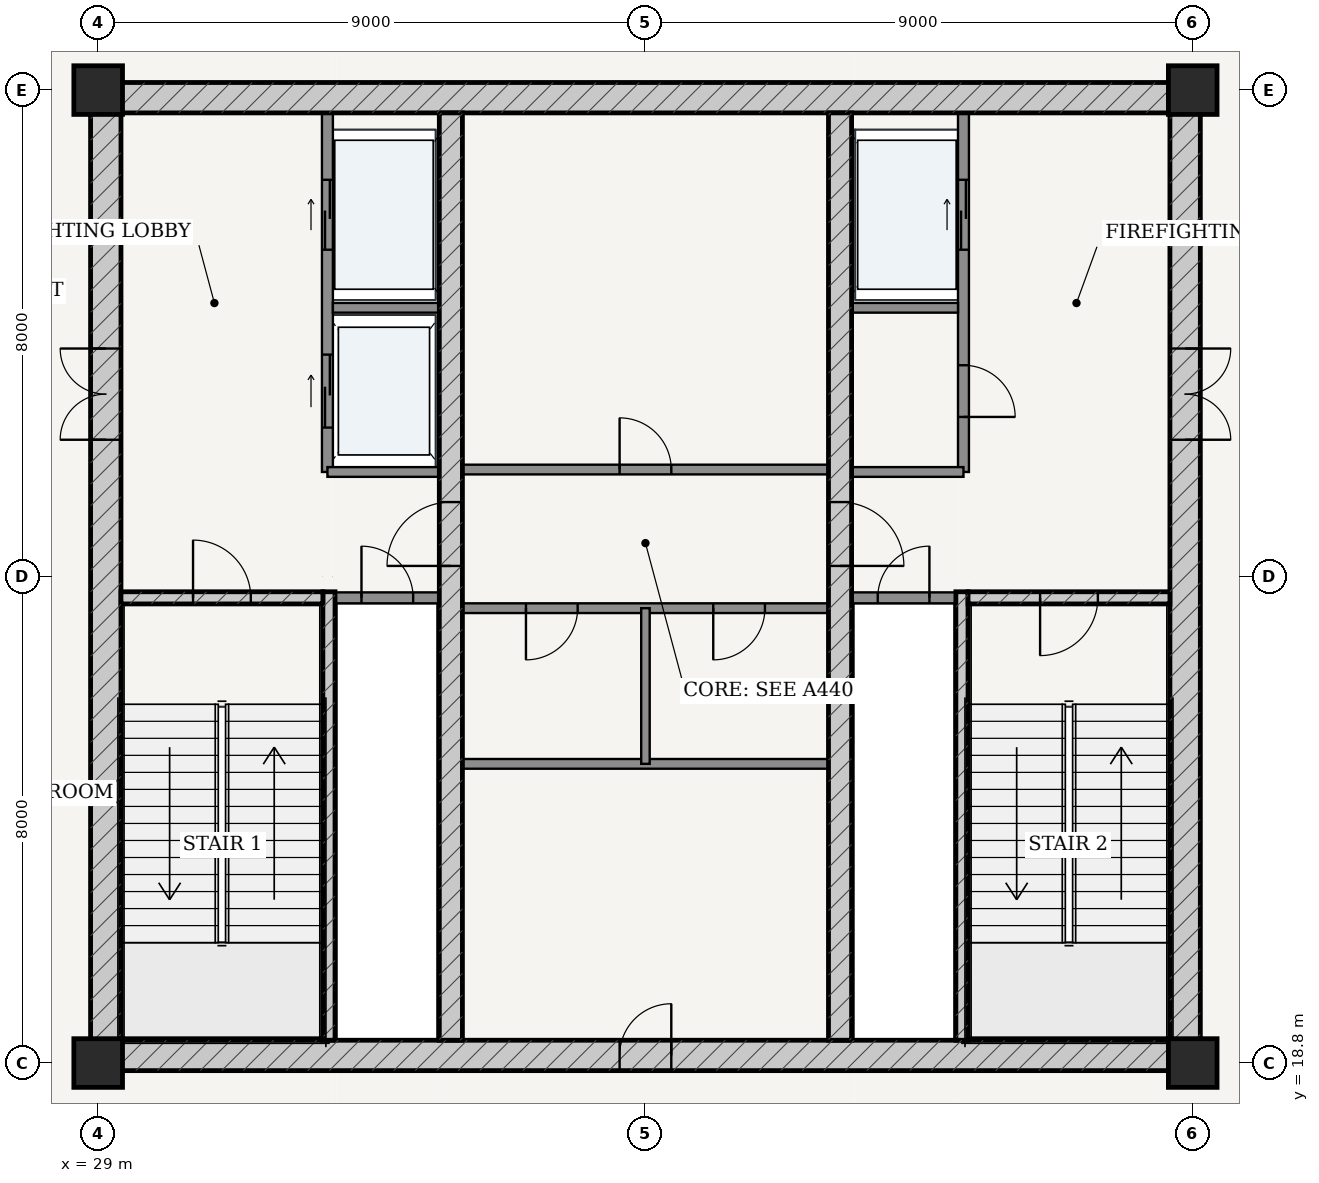
"""IFC4 building model, lengths in metres.
Left out: names, types, materials, properties, quantities, classifications, styles, units other than length and angle.
Written with IfcOpenShell. Run it as: python <this file> out.ifc"""

import sys

from ifc_helpers import new_model, si_unit, direction, frame, frame_2d, origin, origin_2d, place, context, subcontext, project, spatial, rectangle, extrude, source, transform, mapped, element, fill, save


model = new_model("IFC4")
c1 = context("Model", 3, precision=1e-05, world=origin(), true_north=direction((-0.2419218956, 0.970295726276)))
c2 = subcontext(c1, "Body", "Model", "MODEL_VIEW")
j1 = project(units=[si_unit("LENGTHUNIT", "METRE"), si_unit("PLANEANGLEUNIT", "RADIAN")], contexts=[c1])
p1 = place(None, origin())
s1 = spatial("IfcSite", under=j1, at=p1, CompositionType="ELEMENT")
p2 = place(p1, origin())
s2 = spatial("IfcBuilding", under=s1, at=p2, CompositionType="ELEMENT")
p3 = place(p2, frame((0.0, 0.0, 306.1)))
s3 = spatial("IfcBuildingStorey", under=s2, at=p3, CompositionType="ELEMENT", Elevation=306.1)
for number, where, z_axis, x_axis in (
    (1, (29.0, 18.8, 0.0), (0.0, 0.0, 1.0), (1.0, 0.0, 0.0)),
    (2, (47.0, 18.8, 0.0), (0.0, 0.0, 1.0), (1.0, 0.0, 0.0)),
    (3, (47.0, 34.8, 0.0), (0.0, 0.0, 1.0), (1.0, 0.0, 0.0)),
    (4, (29.0, 34.8, 0.0), (0.0, 0.0, 1.0), (1.0, 0.0, 0.0)),
):
    element("IfcColumn", number, at=place(p3, frame(where, z_axis=z_axis, x_axis=x_axis)), inside=s3, PredefinedType="COLUMN", context=c2, shape_type="SweptSolid", body=[
        extrude(rectangle(XDim=0.8, YDim=0.8, at=origin_2d()), origin(), (0.0, 0.0, 1.0), 5.2),
    ])
p4 = place(p3, frame((28.875, 18.925, 0.0), z_axis=(0.0, 0.0, 1.0), x_axis=(1.0, 0.0, 0.0)))
e5 = element("IfcWall", 5, at=p4, inside=s3, PredefinedType="SHEAR", context=c2, shape_type="SweptSolid", body=[
    extrude(rectangle(XDim=18.25, YDim=0.5, at=frame_2d((9.125, 0.0))), origin(), (0.0, 0.0, 1.0), 4.78),
])
p5 = place(p4, frame((8.7, 0.0, 0.0)))
e6 = element("IfcOpeningElement", 6, at=p5, cuts=e5, PredefinedType="OPENING", context=c2, shape_type="SweptSolid", body=[
    extrude(rectangle(XDim=0.85, YDim=2.1, at=frame_2d((0.425, 1.05))), frame((0.0, 0.26, 0.0), z_axis=(0.0, -1.0, 0.0), x_axis=(1.0, 0.0, 0.0)), (0.0, 0.0, 1.0), 0.52),
])
p6 = place(p3, frame((28.875, 34.675, 0.0), z_axis=(0.0, 0.0, 1.0), x_axis=(1.0, 0.0, 0.0)))
e7 = element("IfcWall", 7, at=p6, inside=s3, PredefinedType="SHEAR", context=c2, shape_type="SweptSolid", body=[
    extrude(rectangle(XDim=18.25, YDim=0.5, at=frame_2d((9.125, 0.0))), origin(), (0.0, 0.0, 1.0), 4.78),
])
p7 = place(p3, frame((29.125, 19.175, 0.0), z_axis=(0.0, 0.0, 1.0), x_axis=(0.0, 1.0, 0.0)))
e8 = element("IfcWall", 8, at=p7, inside=s3, PredefinedType="SHEAR", context=c2, shape_type="SweptSolid", body=[
    extrude(rectangle(XDim=15.25, YDim=0.5, at=frame_2d((7.625, 0.0))), origin(), (0.0, 0.0, 1.0), 4.78),
])
p8 = place(p7, frame((9.875, 0.0, 0.0)))
e9 = element("IfcOpeningElement", 9, at=p8, cuts=e8, PredefinedType="OPENING", context=c2, shape_type="SweptSolid", body=[
    extrude(rectangle(XDim=1.5, YDim=2.2, at=frame_2d((0.75, 1.1))), frame((0.0, 0.26, 0.0), z_axis=(0.0, -1.0, 0.0), x_axis=(1.0, 0.0, 0.0)), (0.0, 0.0, 1.0), 0.52),
])
p9 = place(p3, frame((46.875, 19.175, 0.0), z_axis=(0.0, 0.0, 1.0), x_axis=(0.0, 1.0, 0.0)))
e10 = element("IfcWall", 10, at=p9, inside=s3, PredefinedType="SHEAR", context=c2, shape_type="SweptSolid", body=[
    extrude(rectangle(XDim=15.25, YDim=0.5, at=frame_2d((7.625, 0.0))), origin(), (0.0, 0.0, 1.0), 4.78),
])
p10 = place(p9, frame((9.875, 0.0, 0.0)))
e11 = element("IfcOpeningElement", 11, at=p10, cuts=e10, PredefinedType="OPENING", context=c2, shape_type="SweptSolid", body=[
    extrude(rectangle(XDim=1.5, YDim=2.2, at=frame_2d((0.75, 1.1))), frame((0.0, 0.26, 0.0), z_axis=(0.0, -1.0, 0.0), x_axis=(1.0, 0.0, 0.0)), (0.0, 0.0, 1.0), 0.52),
])
p11 = place(p3, frame((32.795, 19.175, 0.0), z_axis=(0.0, 0.0, 1.0), x_axis=(0.0, 1.0, 0.0)))
e12 = element("IfcWall", 12, at=p11, inside=s3, PredefinedType="SOLIDWALL", context=c2, shape_type="SweptSolid", body=[
    extrude(rectangle(XDim=7.375, YDim=0.2, at=frame_2d((3.688, 0.0))), origin(), (0.0, 0.0, 1.0), 4.78),
])
p12 = place(p3, frame((29.375, 26.45, 0.0), z_axis=(0.0, 0.0, 1.0), x_axis=(1.0, 0.0, 0.0)))
e13 = element("IfcWall", 13, at=p12, inside=s3, PredefinedType="SOLIDWALL", context=c2, shape_type="SweptSolid", body=[
    extrude(rectangle(XDim=3.32, YDim=0.2, at=frame_2d((1.66, 0.0))), origin(), (0.0, 0.0, 1.0), 4.78),
])
p13 = place(p12, frame((1.185, 0.0, 0.0)))
e14 = element("IfcOpeningElement", 14, at=p13, cuts=e13, PredefinedType="OPENING", context=c2, shape_type="SweptSolid", body=[
    extrude(rectangle(XDim=0.95, YDim=2.15, at=frame_2d((0.475, 1.075))), frame((0.0, 0.11, 0.0), z_axis=(0.0, -1.0, 0.0), x_axis=(1.0, 0.0, 0.0)), (0.0, 0.0, 1.0), 0.22),
])
p14 = place(p3, frame((43.205, 19.175, 0.0), z_axis=(0.0, 0.0, 1.0), x_axis=(0.0, 1.0, 0.0)))
e15 = element("IfcWall", 15, at=p14, inside=s3, PredefinedType="SOLIDWALL", context=c2, shape_type="SweptSolid", body=[
    extrude(rectangle(XDim=7.375, YDim=0.2, at=frame_2d((3.688, 0.0))), origin(), (0.0, 0.0, 1.0), 4.78),
])
p15 = place(p3, frame((43.305, 26.45, 0.0), z_axis=(0.0, 0.0, 1.0), x_axis=(1.0, 0.0, 0.0)))
e16 = element("IfcWall", 16, at=p15, inside=s3, PredefinedType="SOLIDWALL", context=c2, shape_type="SweptSolid", body=[
    extrude(rectangle(XDim=3.32, YDim=0.2, at=frame_2d((1.66, 0.0))), origin(), (0.0, 0.0, 1.0), 4.78),
])
p16 = place(p15, frame((1.185, 0.0, 0.0)))
e17 = element("IfcOpeningElement", 17, at=p16, cuts=e16, PredefinedType="OPENING", context=c2, shape_type="SweptSolid", body=[
    extrude(rectangle(XDim=0.95, YDim=2.15, at=frame_2d((0.475, 1.075))), frame((0.0, 0.11, 0.0), z_axis=(0.0, -1.0, 0.0), x_axis=(1.0, 0.0, 0.0)), (0.0, 0.0, 1.0), 0.22),
])
p17 = place(p3, frame((34.8, 19.175, 0.0), z_axis=(0.0, 0.0, 1.0), x_axis=(0.0, 1.0, 0.0)))
e18 = element("IfcWall", 18, at=p17, inside=s3, PredefinedType="SHEAR", context=c2, shape_type="SweptSolid", body=[
    extrude(rectangle(XDim=15.25, YDim=0.38, at=frame_2d((7.625, 0.0))), origin(), (0.0, 0.0, 1.0), 4.78),
])
p18 = place(p17, frame((7.8, 0.0, 0.0)))
e19 = element("IfcOpeningElement", 19, at=p18, cuts=e18, PredefinedType="OPENING", context=c2, shape_type="SweptSolid", body=[
    extrude(rectangle(XDim=1.05, YDim=2.15, at=frame_2d((0.525, 1.075))), frame((0.0, 0.2, 0.0), z_axis=(0.0, -1.0, 0.0), x_axis=(1.0, 0.0, 0.0)), (0.0, 0.0, 1.0), 0.4),
])
p19 = place(p3, frame((41.2, 19.175, 0.0), z_axis=(0.0, 0.0, 1.0), x_axis=(0.0, 1.0, 0.0)))
e20 = element("IfcWall", 20, at=p19, inside=s3, PredefinedType="SHEAR", context=c2, shape_type="SweptSolid", body=[
    extrude(rectangle(XDim=15.25, YDim=0.38, at=frame_2d((7.625, 0.0))), origin(), (0.0, 0.0, 1.0), 4.78),
])
p20 = place(p19, frame((7.8, 0.0, 0.0)))
e21 = element("IfcOpeningElement", 21, at=p20, cuts=e20, PredefinedType="OPENING", context=c2, shape_type="SweptSolid", body=[
    extrude(rectangle(XDim=1.05, YDim=2.15, at=frame_2d((0.525, 1.075))), frame((0.0, 0.2, 0.0), z_axis=(0.0, -1.0, 0.0), x_axis=(1.0, 0.0, 0.0)), (0.0, 0.0, 1.0), 0.4),
])
p21 = place(p3, frame((32.9, 26.45, 0.0), z_axis=(0.0, 0.0, 1.0), x_axis=(1.0, 0.0, 0.0)))
e22 = element("IfcWall", 22, at=p21, inside=s3, PredefinedType="PARTITIONING", context=c2, shape_type="SweptSolid", body=[
    extrude(rectangle(XDim=1.71, YDim=0.18, at=frame_2d((0.855, 0.0))), origin(), (0.0, 0.0, 1.0), 4.78),
])
p22 = place(p21, frame((0.43, 0.0, 0.0)))
e23 = element("IfcOpeningElement", 23, at=p22, cuts=e22, PredefinedType="OPENING", context=c2, shape_type="SweptSolid", body=[
    extrude(rectangle(XDim=0.85, YDim=2.1, at=frame_2d((0.425, 1.05))), frame((0.0, 0.1, 0.0), z_axis=(0.0, -1.0, 0.0), x_axis=(1.0, 0.0, 0.0)), (0.0, 0.0, 1.0), 0.2),
])
p23 = place(p3, frame((41.39, 26.45, 0.0), z_axis=(0.0, 0.0, 1.0), x_axis=(1.0, 0.0, 0.0)))
e24 = element("IfcWall", 24, at=p23, inside=s3, PredefinedType="PARTITIONING", context=c2, shape_type="SweptSolid", body=[
    extrude(rectangle(XDim=1.71, YDim=0.18, at=frame_2d((0.855, 0.0))), origin(), (0.0, 0.0, 1.0), 4.78),
])
p24 = place(p23, frame((0.43, 0.0, 0.0)))
e25 = element("IfcOpeningElement", 25, at=p24, cuts=e24, PredefinedType="OPENING", context=c2, shape_type="SweptSolid", body=[
    extrude(rectangle(XDim=0.85, YDim=2.1, at=frame_2d((0.425, 1.05))), frame((0.0, 0.1, 0.0), z_axis=(0.0, -1.0, 0.0), x_axis=(1.0, 0.0, 0.0)), (0.0, 0.0, 1.0), 0.2),
])
p25 = place(p3, frame((32.77, 28.52, 0.0), z_axis=(0.0, 0.0, 1.0), x_axis=(0.0, 1.0, 0.0)))
e26 = element("IfcWall", 26, at=p25, inside=s3, PredefinedType="PARTITIONING", context=c2, shape_type="SweptSolid", body=[
    extrude(rectangle(XDim=5.905, YDim=0.18, at=frame_2d((2.953, 0.0))), origin(), (0.0, 0.0, 1.0), 4.78),
])
p26 = place(p25, frame((3.655, 0.0, 0.0)))
e27 = element("IfcOpeningElement", 27, at=p26, cuts=e26, PredefinedType="OPENING", context=c2, shape_type="SweptSolid", body=[
    extrude(rectangle(XDim=1.15, YDim=2.2, at=frame_2d((0.575, 1.1))), frame((0.0, 0.1, 0.0), z_axis=(0.0, -1.0, 0.0), x_axis=(1.0, 0.0, 0.0)), (0.0, 0.0, 1.0), 0.2),
])
p27 = place(p25, frame((0.73, 0.0, 0.0)))
e28 = element("IfcOpeningElement", 28, at=p27, cuts=e26, PredefinedType="OPENING", context=c2, shape_type="SweptSolid", body=[
    extrude(rectangle(XDim=1.2, YDim=2.25, at=frame_2d((0.6, 1.125))), frame((0.0, 0.1, 0.0), z_axis=(0.0, -1.0, 0.0), x_axis=(1.0, 0.0, 0.0)), (0.0, 0.0, 1.0), 0.2),
])
p28 = place(p3, frame((32.86, 31.22, 0.0), z_axis=(0.0, 0.0, 1.0), x_axis=(1.0, 0.0, 0.0)))
e29 = element("IfcWall", 29, at=p28, inside=s3, PredefinedType="PARTITIONING", context=c2, shape_type="SweptSolid", body=[
    extrude(rectangle(XDim=1.75, YDim=0.16, at=frame_2d((0.875, 0.0))), origin(), (0.0, 0.0, 1.0), 4.78),
])
p29 = place(p3, frame((32.77, 28.52, 0.0), z_axis=(0.0, 0.0, 1.0), x_axis=(1.0, 0.0, 0.0)))
e30 = element("IfcWall", 30, at=p29, inside=s3, PredefinedType="PARTITIONING", context=c2, shape_type="SweptSolid", body=[
    extrude(rectangle(XDim=1.84, YDim=0.16, at=frame_2d((0.92, 0.0))), origin(), (0.0, 0.0, 1.0), 4.78),
])
p30 = place(p3, frame((43.23, 28.52, 0.0), z_axis=(0.0, 0.0, 1.0), x_axis=(0.0, 1.0, 0.0)))
e31 = element("IfcWall", 31, at=p30, inside=s3, PredefinedType="PARTITIONING", context=c2, shape_type="SweptSolid", body=[
    extrude(rectangle(XDim=5.905, YDim=0.18, at=frame_2d((2.953, 0.0))), origin(), (0.0, 0.0, 1.0), 4.78),
])
p31 = place(p30, frame((0.905, 0.0, 0.0)))
e32 = element("IfcOpeningElement", 32, at=p31, cuts=e31, PredefinedType="OPENING", context=c2, shape_type="SweptSolid", body=[
    extrude(rectangle(XDim=0.85, YDim=2.1, at=frame_2d((0.425, 1.05))), frame((0.0, 0.1, 0.0), z_axis=(0.0, -1.0, 0.0), x_axis=(1.0, 0.0, 0.0)), (0.0, 0.0, 1.0), 0.2),
])
p32 = place(p30, frame((3.655, 0.0, 0.0)))
e33 = element("IfcOpeningElement", 33, at=p32, cuts=e31, PredefinedType="OPENING", context=c2, shape_type="SweptSolid", body=[
    extrude(rectangle(XDim=1.15, YDim=2.2, at=frame_2d((0.575, 1.1))), frame((0.0, 0.1, 0.0), z_axis=(0.0, -1.0, 0.0), x_axis=(1.0, 0.0, 0.0)), (0.0, 0.0, 1.0), 0.2),
])
p33 = place(p3, frame((41.39, 31.22, 0.0), z_axis=(0.0, 0.0, 1.0), x_axis=(1.0, 0.0, 0.0)))
e34 = element("IfcWall", 34, at=p33, inside=s3, PredefinedType="PARTITIONING", context=c2, shape_type="SweptSolid", body=[
    extrude(rectangle(XDim=1.75, YDim=0.16, at=frame_2d((0.875, 0.0))), origin(), (0.0, 0.0, 1.0), 4.78),
])
p34 = place(p3, frame((41.39, 28.52, 0.0), z_axis=(0.0, 0.0, 1.0), x_axis=(1.0, 0.0, 0.0)))
e35 = element("IfcWall", 35, at=p34, inside=s3, PredefinedType="PARTITIONING", context=c2, shape_type="SweptSolid", body=[
    extrude(rectangle(XDim=1.84, YDim=0.16, at=frame_2d((0.92, 0.0))), origin(), (0.0, 0.0, 1.0), 4.78),
])
p35 = place(p3, frame((34.99, 28.56, 0.0), z_axis=(0.0, 0.0, 1.0), x_axis=(1.0, 0.0, 0.0)))
e36 = element("IfcWall", 36, at=p35, inside=s3, PredefinedType="PARTITIONING", context=c2, shape_type="SweptSolid", body=[
    extrude(rectangle(XDim=6.02, YDim=0.16, at=frame_2d((3.01, 0.0))), origin(), (0.0, 0.0, 1.0), 4.78),
])
p36 = place(p35, frame((2.585, 0.0, 0.0)))
e37 = element("IfcOpeningElement", 37, at=p36, cuts=e36, PredefinedType="OPENING", context=c2, shape_type="SweptSolid", body=[
    extrude(rectangle(XDim=0.85, YDim=2.1, at=frame_2d((0.425, 1.05))), frame((0.0, 0.09, 0.0), z_axis=(0.0, -1.0, 0.0), x_axis=(1.0, 0.0, 0.0)), (0.0, 0.0, 1.0), 0.18),
])
p37 = place(p3, frame((34.99, 26.28, 0.0), z_axis=(0.0, 0.0, 1.0), x_axis=(1.0, 0.0, 0.0)))
e38 = element("IfcWall", 38, at=p37, inside=s3, PredefinedType="PARTITIONING", context=c2, shape_type="SweptSolid", body=[
    extrude(rectangle(XDim=6.02, YDim=0.16, at=frame_2d((3.01, 0.0))), origin(), (0.0, 0.0, 1.0), 4.78),
])
p38 = place(p37, frame((1.045, 0.0, 0.0)))
e39 = element("IfcOpeningElement", 39, at=p38, cuts=e38, PredefinedType="OPENING", context=c2, shape_type="SweptSolid", body=[
    extrude(rectangle(XDim=0.85, YDim=2.1, at=frame_2d((0.425, 1.05))), frame((0.0, 0.09, 0.0), z_axis=(0.0, -1.0, 0.0), x_axis=(1.0, 0.0, 0.0)), (0.0, 0.0, 1.0), 0.18),
])
p39 = place(p37, frame((4.125, 0.0, 0.0)))
e40 = element("IfcOpeningElement", 40, at=p39, cuts=e38, PredefinedType="OPENING", context=c2, shape_type="SweptSolid", body=[
    extrude(rectangle(XDim=0.85, YDim=2.1, at=frame_2d((0.425, 1.05))), frame((0.0, 0.09, 0.0), z_axis=(0.0, -1.0, 0.0), x_axis=(1.0, 0.0, 0.0)), (0.0, 0.0, 1.0), 0.18),
])
p40 = place(p3, frame((34.99, 23.72, 0.0), z_axis=(0.0, 0.0, 1.0), x_axis=(1.0, 0.0, 0.0)))
e41 = element("IfcWall", 41, at=p40, inside=s3, PredefinedType="PARTITIONING", context=c2, shape_type="SweptSolid", body=[
    extrude(rectangle(XDim=6.02, YDim=0.16, at=frame_2d((3.01, 0.0))), origin(), (0.0, 0.0, 1.0), 4.78),
])
p41 = place(p3, frame((38.0, 23.72, 0.0), z_axis=(0.0, 0.0, 1.0), x_axis=(0.0, 1.0, 0.0)))
e42 = element("IfcWall", 42, at=p41, inside=s3, PredefinedType="PARTITIONING", context=c2, shape_type="SweptSolid", body=[
    extrude(rectangle(XDim=2.56, YDim=0.14, at=frame_2d((1.28, 0.0))), origin(), (0.0, 0.0, 1.0), 4.78),
])
m1 = source(origin(), c2, "Body", "SweptSolid", [
    extrude(rectangle(XDim=1.5, YDim=2.2, at=frame_2d((0.75, 1.1))), frame((0.0, 0.025, 0.0), z_axis=(0.0, -1.0, 0.0), x_axis=(1.0, 0.0, 0.0)), (0.0, 0.0, 1.0), 0.05),
])
p42 = place(p8, origin())
e43 = element("IfcDoor", 43, at=p42, inside=s3, OperationType="DOUBLE_DOOR_SINGLE_SWING", PredefinedType="DOOR", context=c2, shape_type="MappedRepresentation", body=[
    mapped(m1, transform((0.0, 0.0, 0.0), scale=1.0)),
])
fill(e9, e43)
p43 = place(p10, frame((1.5, 0.0, 0.0), z_axis=(0.0, 0.0, 1.0), x_axis=(-1.0, 0.0, 0.0)))
e44 = element("IfcDoor", 44, at=p43, inside=s3, OperationType="DOUBLE_DOOR_SINGLE_SWING", PredefinedType="DOOR", context=c2, shape_type="MappedRepresentation", body=[
    mapped(m1, transform((0.0, 0.0, 0.0), scale=1.0)),
])
fill(e11, e44)
m2 = source(origin(), c2, "Body", "SweptSolid", [
    extrude(rectangle(XDim=1.05, YDim=2.15, at=frame_2d((0.525, 1.075))), frame((0.0, 0.025, 0.0), z_axis=(0.0, -1.0, 0.0), x_axis=(1.0, 0.0, 0.0)), (0.0, 0.0, 1.0), 0.05),
])
p44 = place(p18, origin())
e45 = element("IfcDoor", 45, at=p44, inside=s3, OperationType="SINGLE_SWING_LEFT", PredefinedType="DOOR", context=c2, shape_type="MappedRepresentation", body=[
    mapped(m2, transform((0.0, 0.0, 0.0), scale=1.0)),
])
fill(e19, e45)
p45 = place(p20, frame((1.05, 0.0, 0.0), z_axis=(0.0, 0.0, 1.0), x_axis=(-1.0, 0.0, 0.0)))
e46 = element("IfcDoor", 46, at=p45, inside=s3, OperationType="SINGLE_SWING_RIGHT", PredefinedType="DOOR", context=c2, shape_type="MappedRepresentation", body=[
    mapped(m2, transform((0.0, 0.0, 0.0), scale=1.0)),
])
fill(e21, e46)
m3 = source(origin(), c2, "Body", "SweptSolid", [
    extrude(rectangle(XDim=0.95, YDim=2.15, at=frame_2d((0.475, 1.075))), frame((0.0, 0.025, 0.0), z_axis=(0.0, -1.0, 0.0), x_axis=(1.0, 0.0, 0.0)), (0.0, 0.0, 1.0), 0.05),
])
p46 = place(p13, origin())
e47 = element("IfcDoor", 47, at=p46, inside=s3, OperationType="SINGLE_SWING_LEFT", PredefinedType="DOOR", context=c2, shape_type="MappedRepresentation", body=[
    mapped(m3, transform((0.0, 0.0, 0.0), scale=1.0)),
])
fill(e14, e47)
p47 = place(p16, frame((0.95, 0.0, 0.0), z_axis=(0.0, 0.0, 1.0), x_axis=(-1.0, 0.0, 0.0)))
e48 = element("IfcDoor", 48, at=p47, inside=s3, OperationType="SINGLE_SWING_RIGHT", PredefinedType="DOOR", context=c2, shape_type="MappedRepresentation", body=[
    mapped(m3, transform((0.0, 0.0, 0.0), scale=1.0)),
])
fill(e17, e48)
m4 = source(origin(), c2, "Body", "SweptSolid", [
    extrude(rectangle(XDim=0.85, YDim=2.1, at=frame_2d((0.425, 1.05))), frame((0.0, 0.025, 0.0), z_axis=(0.0, -1.0, 0.0), x_axis=(1.0, 0.0, 0.0)), (0.0, 0.0, 1.0), 0.05),
])
p48 = place(p22, origin())
e49 = element("IfcDoor", 49, at=p48, inside=s3, OperationType="SINGLE_SWING_LEFT", PredefinedType="DOOR", context=c2, shape_type="MappedRepresentation", body=[
    mapped(m4, transform((0.0, 0.0, 0.0), scale=1.0)),
])
fill(e23, e49)
p49 = place(p24, origin())
e50 = element("IfcDoor", 50, at=p49, inside=s3, OperationType="SINGLE_SWING_RIGHT", PredefinedType="DOOR", context=c2, shape_type="MappedRepresentation", body=[
    mapped(m4, transform((0.0, 0.0, 0.0), scale=1.0)),
])
fill(e25, e50)
p50 = place(p31, frame((0.85, 0.0, 0.0), z_axis=(0.0, 0.0, 1.0), x_axis=(-1.0, 0.0, 0.0)))
e51 = element("IfcDoor", 51, at=p50, inside=s3, OperationType="SINGLE_SWING_RIGHT", PredefinedType="DOOR", context=c2, shape_type="MappedRepresentation", body=[
    mapped(m4, transform((0.0, 0.0, 0.0), scale=1.0)),
])
fill(e32, e51)
p51 = place(p36, origin())
e52 = element("IfcDoor", 52, at=p51, inside=s3, OperationType="SINGLE_SWING_LEFT", PredefinedType="DOOR", context=c2, shape_type="MappedRepresentation", body=[
    mapped(m4, transform((0.0, 0.0, 0.0), scale=1.0)),
])
fill(e37, e52)
p52 = place(p38, frame((0.85, 0.0, 0.0), z_axis=(0.0, 0.0, 1.0), x_axis=(-1.0, 0.0, 0.0)))
e53 = element("IfcDoor", 53, at=p52, inside=s3, OperationType="SINGLE_SWING_RIGHT", PredefinedType="DOOR", context=c2, shape_type="MappedRepresentation", body=[
    mapped(m4, transform((0.0, 0.0, 0.0), scale=1.0)),
])
fill(e39, e53)
p53 = place(p39, frame((0.85, 0.0, 0.0), z_axis=(0.0, 0.0, 1.0), x_axis=(-1.0, 0.0, 0.0)))
e54 = element("IfcDoor", 54, at=p53, inside=s3, OperationType="SINGLE_SWING_RIGHT", PredefinedType="DOOR", context=c2, shape_type="MappedRepresentation", body=[
    mapped(m4, transform((0.0, 0.0, 0.0), scale=1.0)),
])
fill(e40, e54)
p54 = place(p5, origin())
e55 = element("IfcDoor", 55, at=p54, inside=s3, OperationType="SINGLE_SWING_RIGHT", PredefinedType="DOOR", context=c2, shape_type="MappedRepresentation", body=[
    mapped(m4, transform((0.0, 0.0, 0.0), scale=1.0)),
])
fill(e6, e55)
m5 = source(origin(), c2, "Body", "SweptSolid", [
    extrude(rectangle(XDim=1.15, YDim=2.2, at=frame_2d((0.575, 1.1))), frame((0.0, 0.025, 0.0), z_axis=(0.0, -1.0, 0.0), x_axis=(1.0, 0.0, 0.0)), (0.0, 0.0, 1.0), 0.05),
])
p55 = place(p26, origin())
e56 = element("IfcDoor", 56, at=p55, inside=s3, OperationType="DOUBLE_DOOR_SLIDING", PredefinedType="DOOR", context=c2, shape_type="MappedRepresentation", body=[
    mapped(m5, transform((0.0, 0.0, 0.0), scale=1.0)),
])
fill(e27, e56)
p56 = place(p32, origin())
e57 = element("IfcDoor", 57, at=p56, inside=s3, OperationType="DOUBLE_DOOR_SLIDING", PredefinedType="DOOR", context=c2, shape_type="MappedRepresentation", body=[
    mapped(m5, transform((0.0, 0.0, 0.0), scale=1.0)),
])
fill(e33, e57)
m6 = source(origin(), c2, "Body", "SweptSolid", [
    extrude(rectangle(XDim=1.2, YDim=2.25, at=frame_2d((0.6, 1.125))), frame((0.0, 0.025, 0.0), z_axis=(0.0, -1.0, 0.0), x_axis=(1.0, 0.0, 0.0)), (0.0, 0.0, 1.0), 0.05),
])
p57 = place(p27, origin())
e58 = element("IfcDoor", 58, at=p57, inside=s3, OperationType="DOUBLE_DOOR_SLIDING", PredefinedType="DOOR", context=c2, shape_type="MappedRepresentation", body=[
    mapped(m6, transform((0.0, 0.0, 0.0), scale=1.0)),
])
fill(e28, e58)
save(model, sys.argv[1])
